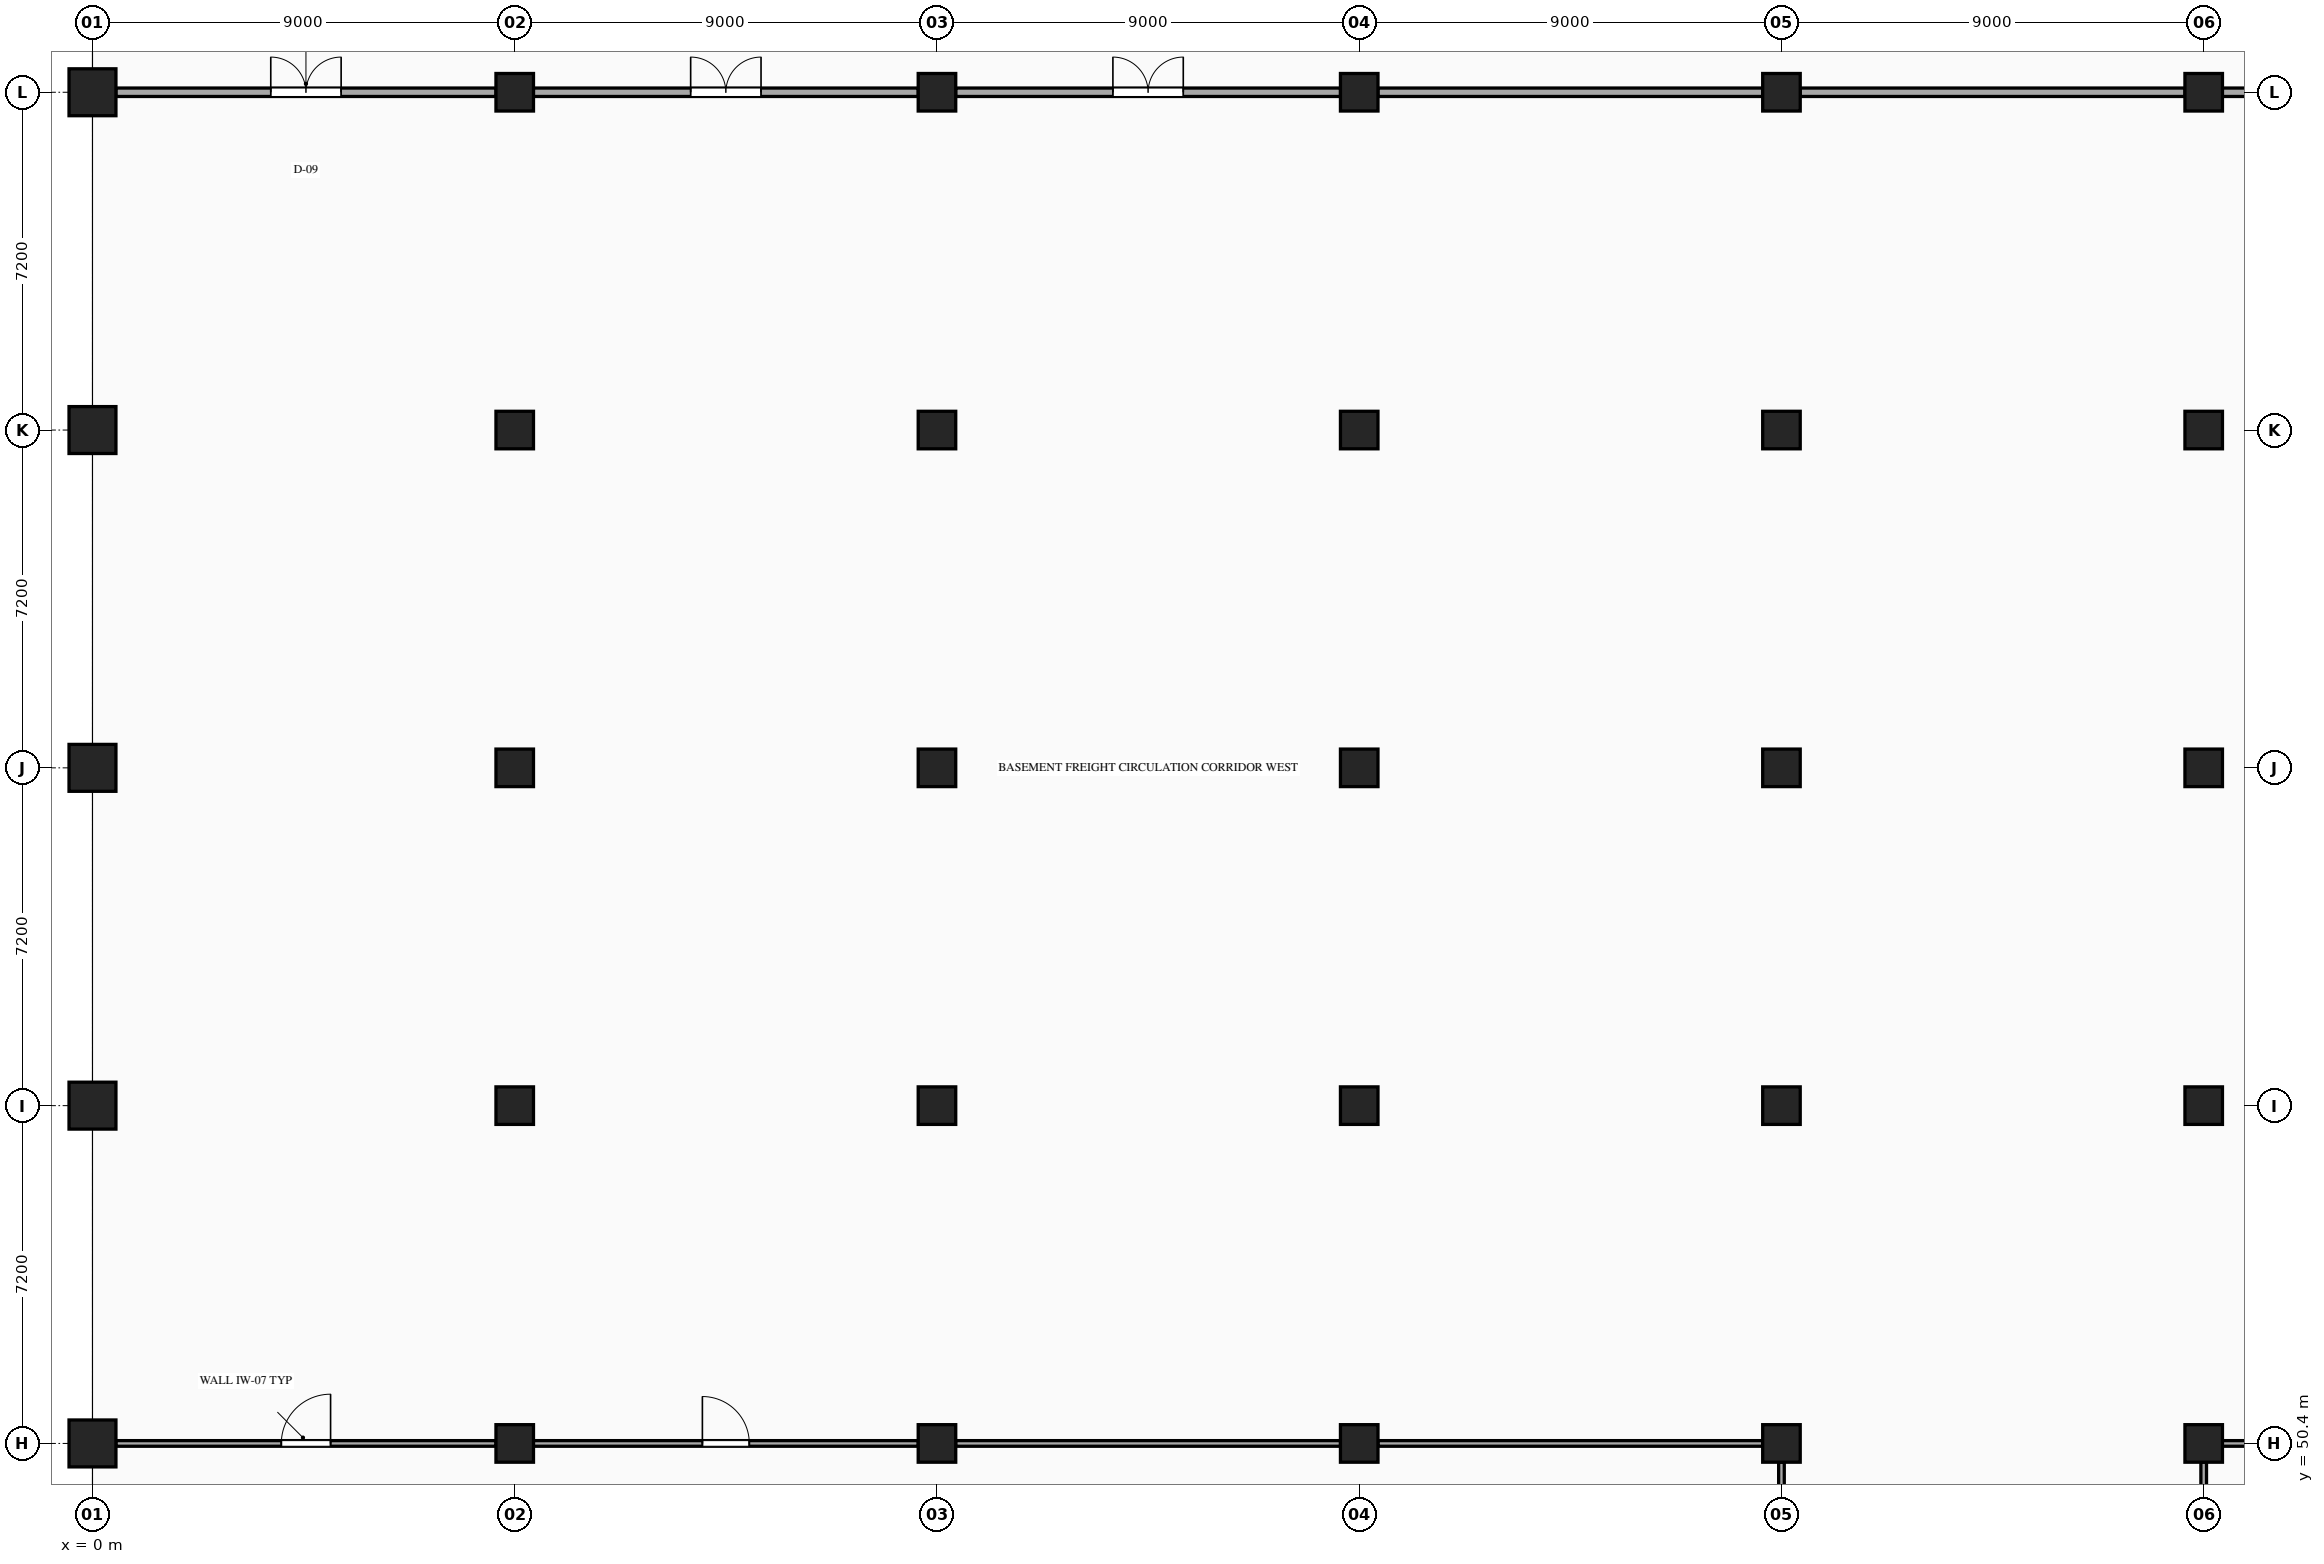
"""IFC4 building model, lengths in metres.
Left out: names, types, materials, properties, quantities, classifications, styles, units other than length and angle.
Written with IfcOpenShell. Run it as: python <this file> out.ifc"""

import sys

from ifc_helpers import new_model, si_unit, direction, frame, frame_2d, origin, origin_2d, place, context, subcontext, project, spatial, rectangle, extrude, element, fill, save


model = new_model("IFC4")
c1 = context("Model", 3, precision=1e-05, world=origin(), true_north=direction((0.0, 1.0)))
c2 = subcontext(c1, "Body", "Model", "MODEL_VIEW")
j1 = project(units=[si_unit("LENGTHUNIT", "METRE"), si_unit("PLANEANGLEUNIT", "RADIAN")], contexts=[c1])
p1 = place(None, origin())
s1 = spatial("IfcSite", under=j1, at=p1, CompositionType="ELEMENT")
p2 = place(p1, origin())
s2 = spatial("IfcBuilding", under=s1, at=p2, CompositionType="ELEMENT")
p3 = place(p2, frame((0.0, 0.0, -5.4)))
s3 = spatial("IfcBuildingStorey", under=s2, at=p3, CompositionType="ELEMENT", Elevation=-5.4)
for number, where, z_axis, x_axis in (
    (1, (0.0, 50.4, 0.0), (0.0, 0.0, 1.0), (1.0, 0.0, 0.0)),
    (2, (0.0, 57.6, 0.0), (0.0, 0.0, 1.0), (1.0, 0.0, 0.0)),
    (3, (0.0, 64.8, 0.0), (0.0, 0.0, 1.0), (1.0, 0.0, 0.0)),
    (4, (0.0, 72.0, 0.0), (0.0, 0.0, 1.0), (1.0, 0.0, 0.0)),
    (5, (0.0, 79.2, 0.0), (0.0, 0.0, 1.0), (1.0, 0.0, 0.0)),
):
    element("IfcColumn", number, at=place(p3, frame(where, z_axis=z_axis, x_axis=x_axis)), inside=s3, PredefinedType="COLUMN", context=c2, shape_type="SweptSolid", body=[
        extrude(rectangle(XDim=1.0, YDim=1.0, at=origin_2d()), origin(), (0.0, 0.0, 1.0), 5.4),
    ])
for number, where, z_axis, x_axis in (
    (6, (9.0, 50.4, 0.0), (0.0, 0.0, 1.0), (1.0, 0.0, 0.0)),
    (7, (9.0, 57.6, 0.0), (0.0, 0.0, 1.0), (1.0, 0.0, 0.0)),
    (8, (9.0, 64.8, 0.0), (0.0, 0.0, 1.0), (1.0, 0.0, 0.0)),
    (9, (9.0, 72.0, 0.0), (0.0, 0.0, 1.0), (1.0, 0.0, 0.0)),
    (10, (9.0, 79.2, 0.0), (0.0, 0.0, 1.0), (1.0, 0.0, 0.0)),
    (11, (18.0, 50.4, 0.0), (0.0, 0.0, 1.0), (1.0, 0.0, 0.0)),
    (12, (18.0, 57.6, 0.0), (0.0, 0.0, 1.0), (1.0, 0.0, 0.0)),
    (13, (18.0, 64.8, 0.0), (0.0, 0.0, 1.0), (1.0, 0.0, 0.0)),
    (14, (18.0, 72.0, 0.0), (0.0, 0.0, 1.0), (1.0, 0.0, 0.0)),
    (15, (18.0, 79.2, 0.0), (0.0, 0.0, 1.0), (1.0, 0.0, 0.0)),
    (16, (27.0, 50.4, 0.0), (0.0, 0.0, 1.0), (1.0, 0.0, 0.0)),
    (17, (27.0, 57.6, 0.0), (0.0, 0.0, 1.0), (1.0, 0.0, 0.0)),
    (18, (27.0, 64.8, 0.0), (0.0, 0.0, 1.0), (1.0, 0.0, 0.0)),
    (19, (27.0, 72.0, 0.0), (0.0, 0.0, 1.0), (1.0, 0.0, 0.0)),
    (20, (27.0, 79.2, 0.0), (0.0, 0.0, 1.0), (1.0, 0.0, 0.0)),
    (21, (36.0, 50.4, 0.0), (0.0, 0.0, 1.0), (1.0, 0.0, 0.0)),
    (22, (36.0, 57.6, 0.0), (0.0, 0.0, 1.0), (1.0, 0.0, 0.0)),
    (23, (36.0, 64.8, 0.0), (0.0, 0.0, 1.0), (1.0, 0.0, 0.0)),
    (24, (36.0, 72.0, 0.0), (0.0, 0.0, 1.0), (1.0, 0.0, 0.0)),
    (25, (36.0, 79.2, 0.0), (0.0, 0.0, 1.0), (1.0, 0.0, 0.0)),
    (26, (45.0, 50.4, 0.0), (0.0, 0.0, 1.0), (1.0, 0.0, 0.0)),
    (27, (45.0, 57.6, 0.0), (0.0, 0.0, 1.0), (1.0, 0.0, 0.0)),
    (28, (45.0, 64.8, 0.0), (0.0, 0.0, 1.0), (1.0, 0.0, 0.0)),
    (29, (45.0, 72.0, 0.0), (0.0, 0.0, 1.0), (1.0, 0.0, 0.0)),
    (30, (45.0, 79.2, 0.0), (0.0, 0.0, 1.0), (1.0, 0.0, 0.0)),
):
    element("IfcColumn", number, at=place(p3, frame(where, z_axis=z_axis, x_axis=x_axis)), inside=s3, PredefinedType="COLUMN", context=c2, shape_type="SweptSolid", body=[
        extrude(rectangle(XDim=0.8, YDim=0.8, at=origin_2d()), origin(), (0.0, 0.0, 1.0), 5.4),
    ])
p4 = place(p3, frame((0.0, 22.15, 0.0), z_axis=(0.0, 0.0, 1.0), x_axis=(0.0, 1.0, 0.0)))
e31 = element("IfcWall", 31, at=p4, inside=s3, PredefinedType="USERDEFINED", context=c2, shape_type="SweptSolid", body=[
    extrude(rectangle(XDim=85.3, YDim=0.42, at=frame_2d((42.65, 0.0))), origin(), (0.0, 0.0, 1.0), 4.08),
])
p5 = place(p3, frame((0.498, 50.4, 0.0), z_axis=(0.0, 0.0, 1.0), x_axis=(1.0, 0.0, 0.0)))
e32 = element("IfcWall", 32, at=p5, inside=s3, PredefinedType="PARTITIONING", context=c2, shape_type="SweptSolid", body=[
    extrude(rectangle(XDim=8.104, YDim=0.12, at=frame_2d((4.052, 0.0))), origin(), (0.0, 0.0, 1.0), 4.113),
])
p6 = place(p5, frame((3.527, 0.0, 0.0)))
e33 = element("IfcOpeningElement", 33, at=p6, cuts=e32, PredefinedType="OPENING", context=c2, shape_type="SweptSolid", body=[
    extrude(rectangle(XDim=1.05, YDim=2.15, at=frame_2d((0.525, 1.075))), frame((0.0, 0.07, 0.0), z_axis=(0.0, -1.0, 0.0), x_axis=(1.0, 0.0, 0.0)), (0.0, 0.0, 1.0), 0.14),
])
p7 = place(p3, frame((9.398, 50.4, 0.0), z_axis=(0.0, 0.0, 1.0), x_axis=(1.0, 0.0, 0.0)))
e34 = element("IfcWall", 34, at=p7, inside=s3, PredefinedType="PARTITIONING", context=c2, shape_type="SweptSolid", body=[
    extrude(rectangle(XDim=8.204, YDim=0.12, at=frame_2d((4.102, 0.0))), origin(), (0.0, 0.0, 1.0), 4.113),
])
p8 = place(p7, frame((3.602, 0.0, 0.0)))
e35 = element("IfcOpeningElement", 35, at=p8, cuts=e34, PredefinedType="OPENING", context=c2, shape_type="SweptSolid", body=[
    extrude(rectangle(XDim=1.0, YDim=2.15, at=frame_2d((0.5, 1.075))), frame((0.0, 0.07, 0.0), z_axis=(0.0, -1.0, 0.0), x_axis=(1.0, 0.0, 0.0)), (0.0, 0.0, 1.0), 0.14),
])
for number, where, z_axis, x_axis in (
    (36, (18.398, 50.4, 0.0), (0.0, 0.0, 1.0), (1.0, 0.0, 0.0)),
    (37, (27.398, 50.4, 0.0), (0.0, 0.0, 1.0), (1.0, 0.0, 0.0)),
):
    element("IfcWall", number, at=place(p3, frame(where, z_axis=z_axis, x_axis=x_axis)), inside=s3, PredefinedType="PARTITIONING", context=c2, shape_type="SweptSolid", body=[
        extrude(rectangle(XDim=8.204, YDim=0.12, at=frame_2d((4.102, 0.0))), origin(), (0.0, 0.0, 1.0), 4.113),
    ])
p9 = place(p3, frame((45.398, 50.4, 0.0), z_axis=(0.0, 0.0, 1.0), x_axis=(1.0, 0.0, 0.0)))
e38 = element("IfcWall", 38, at=p9, inside=s3, PredefinedType="PARTITIONING", context=c2, shape_type="SweptSolid", body=[
    extrude(rectangle(XDim=8.204, YDim=0.12, at=frame_2d((4.102, 0.0))), origin(), (0.0, 0.0, 1.0), 4.113),
])
p10 = place(p9, frame((3.577, 0.0, 0.0)))
e39 = element("IfcOpeningElement", 39, at=p10, cuts=e38, PredefinedType="OPENING", context=c2, shape_type="SweptSolid", body=[
    extrude(rectangle(XDim=1.05, YDim=2.15, at=frame_2d((0.525, 1.075))), frame((0.0, 0.07, 0.0), z_axis=(0.0, -1.0, 0.0), x_axis=(1.0, 0.0, 0.0)), (0.0, 0.0, 1.0), 0.14),
])
p11 = place(p3, frame((0.498, 79.2, 0.0), z_axis=(0.0, 0.0, 1.0), x_axis=(1.0, 0.0, 0.0)))
e40 = element("IfcWall", 40, at=p11, inside=s3, PredefinedType="PARTITIONING", context=c2, shape_type="SweptSolid", body=[
    extrude(rectangle(XDim=8.104, YDim=0.18, at=frame_2d((4.052, 0.0))), origin(), (0.0, 0.0, 1.0), 4.113),
])
p12 = place(p11, frame((3.302, 0.0, 0.0)))
e41 = element("IfcOpeningElement", 41, at=p12, cuts=e40, PredefinedType="OPENING", context=c2, shape_type="SweptSolid", body=[
    extrude(rectangle(XDim=1.5, YDim=2.25, at=frame_2d((0.75, 1.125))), frame((0.0, 0.1, 0.0), z_axis=(0.0, -1.0, 0.0), x_axis=(1.0, 0.0, 0.0)), (0.0, 0.0, 1.0), 0.2),
])
p13 = place(p3, frame((9.398, 79.2, 0.0), z_axis=(0.0, 0.0, 1.0), x_axis=(1.0, 0.0, 0.0)))
e42 = element("IfcWall", 42, at=p13, inside=s3, PredefinedType="PARTITIONING", context=c2, shape_type="SweptSolid", body=[
    extrude(rectangle(XDim=8.204, YDim=0.18, at=frame_2d((4.102, 0.0))), origin(), (0.0, 0.0, 1.0), 4.113),
])
p14 = place(p13, frame((3.352, 0.0, 0.0)))
e43 = element("IfcOpeningElement", 43, at=p14, cuts=e42, PredefinedType="OPENING", context=c2, shape_type="SweptSolid", body=[
    extrude(rectangle(XDim=1.5, YDim=2.25, at=frame_2d((0.75, 1.125))), frame((0.0, 0.1, 0.0), z_axis=(0.0, -1.0, 0.0), x_axis=(1.0, 0.0, 0.0)), (0.0, 0.0, 1.0), 0.2),
])
p15 = place(p3, frame((18.398, 79.2, 0.0), z_axis=(0.0, 0.0, 1.0), x_axis=(1.0, 0.0, 0.0)))
e44 = element("IfcWall", 44, at=p15, inside=s3, PredefinedType="PARTITIONING", context=c2, shape_type="SweptSolid", body=[
    extrude(rectangle(XDim=8.204, YDim=0.18, at=frame_2d((4.102, 0.0))), origin(), (0.0, 0.0, 1.0), 4.113),
])
p16 = place(p15, frame((3.352, 0.0, 0.0)))
e45 = element("IfcOpeningElement", 45, at=p16, cuts=e44, PredefinedType="OPENING", context=c2, shape_type="SweptSolid", body=[
    extrude(rectangle(XDim=1.5, YDim=2.25, at=frame_2d((0.75, 1.125))), frame((0.0, 0.1, 0.0), z_axis=(0.0, -1.0, 0.0), x_axis=(1.0, 0.0, 0.0)), (0.0, 0.0, 1.0), 0.2),
])
for number, where, z_axis, x_axis in (
    (46, (27.398, 79.2, 0.0), (0.0, 0.0, 1.0), (1.0, 0.0, 0.0)),
    (47, (36.398, 79.2, 0.0), (0.0, 0.0, 1.0), (1.0, 0.0, 0.0)),
    (48, (45.398, 79.2, 0.0), (0.0, 0.0, 1.0), (1.0, 0.0, 0.0)),
):
    element("IfcWall", number, at=place(p3, frame(where, z_axis=z_axis, x_axis=x_axis)), inside=s3, PredefinedType="PARTITIONING", context=c2, shape_type="SweptSolid", body=[
        extrude(rectangle(XDim=8.204, YDim=0.18, at=frame_2d((4.102, 0.0))), origin(), (0.0, 0.0, 1.0), 4.113),
    ])
for number, where, z_axis, x_axis in (
    (49, (36.0, 43.598, 0.0), (0.0, 0.0, 1.0), (0.0, 1.0, 0.0)),
    (50, (45.0, 43.598, 0.0), (0.0, 0.0, 1.0), (0.0, 1.0, 0.0)),
):
    element("IfcWall", number, at=place(p3, frame(where, z_axis=z_axis, x_axis=x_axis)), inside=s3, PredefinedType="PARTITIONING", context=c2, shape_type="SweptSolid", body=[
        extrude(rectangle(XDim=6.404, YDim=0.12, at=frame_2d((3.202, 0.0))), origin(), (0.0, 0.0, 1.0), 4.113),
    ])
p17 = place(p6, origin())
e51 = element("IfcDoor", 51, at=p17, inside=s3, OperationType="SINGLE_SWING_RIGHT", PredefinedType="DOOR", context=c2, shape_type="SweptSolid", body=[
    extrude(rectangle(XDim=1.05, YDim=2.15, at=frame_2d((0.525, 1.075))), frame((0.0, 0.025, 0.0), z_axis=(0.0, -1.0, 0.0), x_axis=(1.0, 0.0, 0.0)), (0.0, 0.0, 1.0), 0.05),
])
fill(e33, e51)
p18 = place(p8, origin())
e52 = element("IfcDoor", 52, at=p18, inside=s3, OperationType="SINGLE_SWING_LEFT", PredefinedType="DOOR", context=c2, shape_type="SweptSolid", body=[
    extrude(rectangle(XDim=1.0, YDim=2.15, at=frame_2d((0.5, 1.075))), frame((0.0, 0.025, 0.0), z_axis=(0.0, -1.0, 0.0), x_axis=(1.0, 0.0, 0.0)), (0.0, 0.0, 1.0), 0.05),
])
fill(e35, e52)
p19 = place(p12, origin())
e53 = element("IfcDoor", 53, at=p19, inside=s3, OperationType="DOUBLE_DOOR_SINGLE_SWING", PredefinedType="DOOR", context=c2, shape_type="SweptSolid", body=[
    extrude(rectangle(XDim=1.5, YDim=2.25, at=frame_2d((0.75, 1.125))), frame((0.0, 0.025, 0.0), z_axis=(0.0, -1.0, 0.0), x_axis=(1.0, 0.0, 0.0)), (0.0, 0.0, 1.0), 0.05),
])
fill(e41, e53)
p20 = place(p14, origin())
e54 = element("IfcDoor", 54, at=p20, inside=s3, OperationType="DOUBLE_DOOR_SINGLE_SWING", PredefinedType="DOOR", context=c2, shape_type="SweptSolid", body=[
    extrude(rectangle(XDim=1.5, YDim=2.25, at=frame_2d((0.75, 1.125))), frame((0.0, 0.025, 0.0), z_axis=(0.0, -1.0, 0.0), x_axis=(1.0, 0.0, 0.0)), (0.0, 0.0, 1.0), 0.05),
])
fill(e43, e54)
p21 = place(p16, origin())
e55 = element("IfcDoor", 55, at=p21, inside=s3, OperationType="DOUBLE_DOOR_SINGLE_SWING", PredefinedType="DOOR", context=c2, shape_type="SweptSolid", body=[
    extrude(rectangle(XDim=1.5, YDim=2.25, at=frame_2d((0.75, 1.125))), frame((0.0, 0.025, 0.0), z_axis=(0.0, -1.0, 0.0), x_axis=(1.0, 0.0, 0.0)), (0.0, 0.0, 1.0), 0.05),
])
fill(e45, e55)
save(model, sys.argv[1])
